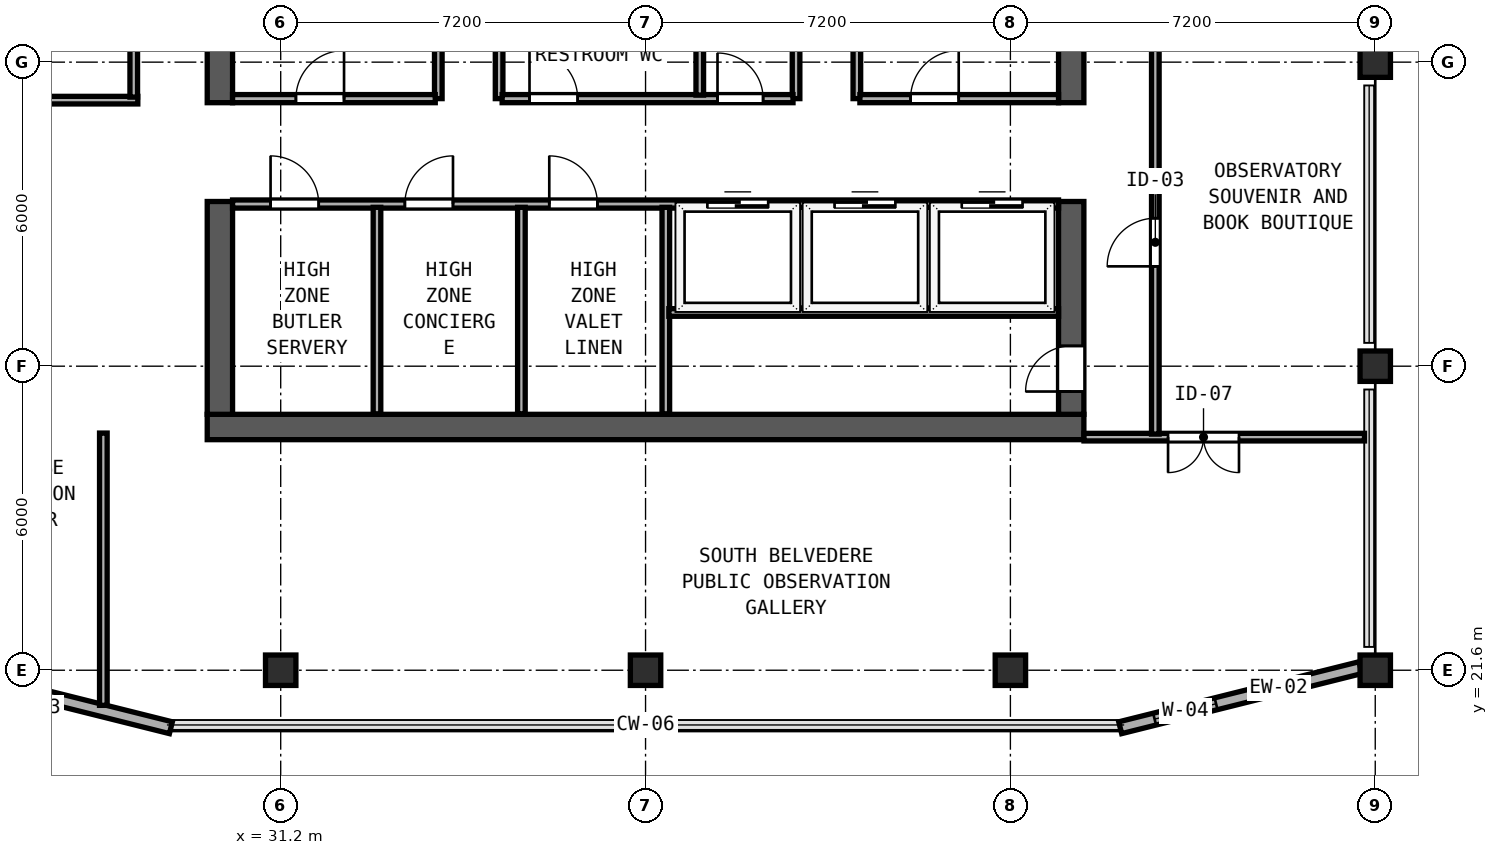
"""IFC4 building model, lengths in metres.
Left out: names, types, materials, properties, quantities, classifications, styles, units other than length and angle.
Written with IfcOpenShell. Run it as: python <this file> out.ifc"""

import sys

from ifc_helpers import new_model, si_unit, direction, frame, frame_2d, origin, origin_2d, place, context, subcontext, project, spatial, rectangle, hollow_rectangle, extrude, element, fill, save


model = new_model("IFC4")
c1 = context("Model", 3, precision=1e-05, world=origin(), true_north=direction((0.0, 1.0)))
c2 = subcontext(c1, "Body", "Model", "MODEL_VIEW")
j1 = project(units=[si_unit("LENGTHUNIT", "METRE"), si_unit("PLANEANGLEUNIT", "RADIAN")], contexts=[c1])
p1 = place(None, origin())
s1 = spatial("IfcSite", under=j1, at=p1, CompositionType="ELEMENT")
p2 = place(p1, origin())
s2 = spatial("IfcBuilding", under=s1, at=p2, CompositionType="ELEMENT")
p3 = place(p2, frame((0.0, 0.0, 318.2)))
s3 = spatial("IfcBuildingStorey", under=s2, at=p3, CompositionType="ELEMENT", Elevation=318.2)
p4 = place(p3, frame((29.75, 26.4, 0.0), z_axis=(0.0, 0.0, 1.0), x_axis=(1.0, 0.0, 0.0)))
e1 = element("IfcWall", 1, at=p4, inside=s3, PredefinedType="SHEAR", context=c2, shape_type="SweptSolid", body=[
    extrude(rectangle(XDim=17.3, YDim=0.5, at=frame_2d((8.65, 0.0))), origin(), (0.0, 0.0, 1.0), 4.76),
])
p5 = place(p3, frame((30.0, 26.65, 0.0), z_axis=(0.0, 0.0, 1.0), x_axis=(0.0, 1.0, 0.0)))
e2 = element("IfcWall", 2, at=p5, inside=s3, PredefinedType="SHEAR", context=c2, shape_type="SweptSolid", body=[
    extrude(rectangle(XDim=4.2, YDim=0.5, at=frame_2d((2.1, 0.0))), origin(), (0.0, 0.0, 1.0), 4.76),
])
p6 = place(p3, frame((30.0, 32.8, 0.0), z_axis=(0.0, 0.0, 1.0), x_axis=(0.0, 1.0, 0.0)))
e3 = element("IfcWall", 3, at=p6, inside=s3, PredefinedType="SHEAR", context=c2, shape_type="SweptSolid", body=[
    extrude(rectangle(XDim=10.15, YDim=0.5, at=frame_2d((5.075, 0.0))), origin(), (0.0, 0.0, 1.0), 4.76),
])
p7 = place(p3, frame((46.8, 26.65, 0.0), z_axis=(0.0, 0.0, 1.0), x_axis=(0.0, 1.0, 0.0)))
e4 = element("IfcWall", 4, at=p7, inside=s3, PredefinedType="SHEAR", context=c2, shape_type="SweptSolid", body=[
    extrude(rectangle(XDim=4.2, YDim=0.5, at=frame_2d((2.1, 0.0))), origin(), (0.0, 0.0, 1.0), 4.76),
])
p8 = place(p7, frame((1.35, 0.0, 0.0), z_axis=(0.0, 0.0, 1.0), x_axis=(-1.0, 0.0, 0.0)))
e5 = element("IfcOpeningElement", 5, at=p8, cuts=e4, PredefinedType="OPENING", context=c2, shape_type="SweptSolid", body=[
    extrude(rectangle(XDim=0.9, YDim=2.1, at=frame_2d((0.45, 1.05))), frame((0.0, 0.26, 0.0), z_axis=(0.0, -1.0, 0.0), x_axis=(1.0, 0.0, 0.0)), (0.0, 0.0, 1.0), 0.52),
])
p9 = place(p3, frame((46.8, 32.8, 0.0), z_axis=(0.0, 0.0, 1.0), x_axis=(0.0, 1.0, 0.0)))
e6 = element("IfcWall", 6, at=p9, inside=s3, PredefinedType="SHEAR", context=c2, shape_type="SweptSolid", body=[
    extrude(rectangle(XDim=10.15, YDim=0.5, at=frame_2d((5.075, 0.0))), origin(), (0.0, 0.0, 1.0), 4.76),
])
for number, where, z_axis, x_axis in (
    (7, (52.8, 21.6, 0.0), (0.0, 0.0, 1.0), (1.0, 0.0, 0.0)),
    (8, (52.8, 33.6, 0.0), (0.0, 0.0, 1.0), (1.0, 0.0, 0.0)),
    (9, (31.2, 21.6, 0.0), (0.0, 0.0, 1.0), (1.0, 0.0, 0.0)),
    (10, (45.6, 21.6, 0.0), (0.0, 0.0, 1.0), (1.0, 0.0, 0.0)),
    (11, (52.8, 27.6, 0.0), (0.0, 0.0, 1.0), (1.0, 0.0, 0.0)),
    (12, (38.4, 21.6, 0.0), (0.0, 0.0, 1.0), (1.0, 0.0, 0.0)),
):
    element("IfcColumn", number, at=place(p3, frame(where, z_axis=z_axis, x_axis=x_axis)), inside=s3, PredefinedType="COLUMN", context=c2, shape_type="SweptSolid", body=[
        extrude(hollow_rectangle(XDim=0.6, YDim=0.6, WallThickness=0.024, at=origin_2d()), origin(), (0.0, 0.0, 1.0), 5.0),
    ])
p10 = place(p3, frame((47.767, 20.465, 0.0), z_axis=(0.0, 0.0, 1.0), x_axis=(0.970142500145, 0.242535625036, 0.0)))
e13 = element("IfcWall", 13, at=p10, inside=s3, PredefinedType="SOLIDWALL", context=c2, shape_type="SweptSolid", body=[
    extrude(rectangle(XDim=4.887, YDim=0.24, at=frame_2d((2.444, 0.0))), origin(), (0.0, 0.0, 1.0), 4.355),
])
p11 = place(p10, frame((0.7, 0.0, 0.85)))
e14 = element("IfcOpeningElement", 14, at=p11, cuts=e13, PredefinedType="OPENING", context=c2, shape_type="SweptSolid", body=[
    extrude(rectangle(XDim=1.25, YDim=1.95, at=frame_2d((0.625, 0.975))), frame((0.0, 0.13, 0.0), z_axis=(0.0, -1.0, 0.0), x_axis=(1.0, 0.0, 0.0)), (0.0, 0.0, 1.0), 0.26),
])
p12 = place(p3, frame((24.292, 21.651, 0.0), z_axis=(0.0, 0.0, 1.0), x_axis=(0.970142500145, -0.242535625036, 0.0)))
e15 = element("IfcWall", 15, at=p12, inside=s3, PredefinedType="SOLIDWALL", context=c2, shape_type="SweptSolid", body=[
    extrude(rectangle(XDim=4.887, YDim=0.24, at=frame_2d((2.444, 0.0))), origin(), (0.0, 0.0, 1.0), 4.355),
])
p13 = place(p12, frame((0.559, 0.0, 0.85)))
e16 = element("IfcOpeningElement", 16, at=p13, cuts=e15, PredefinedType="OPENING", context=c2, shape_type="SweptSolid", body=[
    extrude(rectangle(XDim=1.25, YDim=1.95, at=frame_2d((0.625, 0.975))), frame((0.0, 0.13, 0.0), z_axis=(0.0, -1.0, 0.0), x_axis=(1.0, 0.0, 0.0)), (0.0, 0.0, 1.0), 0.26),
])
for number, where, z_axis, x_axis in (
    (17, (34.31, 32.88, 0.0), (0.0, 0.0, 1.0), (0.0, 1.0, 0.0)),
    (18, (35.51, 32.88, 0.0), (0.0, 0.0, 1.0), (0.0, 1.0, 0.0)),
    (19, (41.37, 32.88, 0.0), (0.0, 0.0, 1.0), (0.0, 1.0, 0.0)),
    (20, (42.57, 32.88, 0.0), (0.0, 0.0, 1.0), (0.0, 1.0, 0.0)),
):
    element("IfcWall", number, at=place(p3, frame(where, z_axis=z_axis, x_axis=x_axis)), inside=s3, PredefinedType="SOLIDWALL", context=c2, shape_type="SweptSolid", body=[
        extrude(rectangle(XDim=2.17, YDim=0.15, at=frame_2d((1.085, 0.0))), origin(), (0.0, 0.0, 1.0), 4.76),
    ])
p14 = place(p3, frame((30.25, 32.88, 0.0), z_axis=(0.0, 0.0, 1.0), x_axis=(1.0, 0.0, 0.0)))
e21 = element("IfcWall", 21, at=p14, inside=s3, PredefinedType="SOLIDWALL", context=c2, shape_type="SweptSolid", body=[
    extrude(rectangle(XDim=4.0, YDim=0.16, at=frame_2d((2.0, 0.0))), origin(), (0.0, 0.0, 1.0), 4.76),
])
p15 = place(p14, frame((2.2, 0.0, 0.0), z_axis=(0.0, 0.0, 1.0), x_axis=(-1.0, 0.0, 0.0)))
e22 = element("IfcOpeningElement", 22, at=p15, cuts=e21, PredefinedType="OPENING", context=c2, shape_type="SweptSolid", body=[
    extrude(rectangle(XDim=0.95, YDim=2.12, at=frame_2d((0.475, 1.06))), frame((0.0, 0.09, 0.0), z_axis=(0.0, -1.0, 0.0), x_axis=(1.0, 0.0, 0.0)), (0.0, 0.0, 1.0), 0.18),
])
p16 = place(p3, frame((35.57, 32.88, 0.0), z_axis=(0.0, 0.0, 1.0), x_axis=(1.0, 0.0, 0.0)))
e23 = element("IfcWall", 23, at=p16, inside=s3, PredefinedType="SOLIDWALL", context=c2, shape_type="SweptSolid", body=[
    extrude(rectangle(XDim=5.74, YDim=0.16, at=frame_2d((2.87, 0.0))), origin(), (0.0, 0.0, 1.0), 4.76),
])
p17 = place(p16, frame((1.49, 0.0, 0.0), z_axis=(0.0, 0.0, 1.0), x_axis=(-1.0, 0.0, 0.0)))
e24 = element("IfcOpeningElement", 24, at=p17, cuts=e23, PredefinedType="OPENING", context=c2, shape_type="SweptSolid", body=[
    extrude(rectangle(XDim=0.95, YDim=2.12, at=frame_2d((0.475, 1.06))), frame((0.0, 0.09, 0.0), z_axis=(0.0, -1.0, 0.0), x_axis=(1.0, 0.0, 0.0)), (0.0, 0.0, 1.0), 0.18),
])
p18 = place(p16, frame((5.15, 0.0, 0.0), z_axis=(0.0, 0.0, 1.0), x_axis=(-1.0, 0.0, 0.0)))
e25 = element("IfcOpeningElement", 25, at=p18, cuts=e23, PredefinedType="OPENING", context=c2, shape_type="SweptSolid", body=[
    extrude(rectangle(XDim=0.9, YDim=2.1, at=frame_2d((0.45, 1.05))), frame((0.0, 0.09, 0.0), z_axis=(0.0, -1.0, 0.0), x_axis=(1.0, 0.0, 0.0)), (0.0, 0.0, 1.0), 0.18),
])
p19 = place(p3, frame((42.63, 32.88, 0.0), z_axis=(0.0, 0.0, 1.0), x_axis=(1.0, 0.0, 0.0)))
e26 = element("IfcWall", 26, at=p19, inside=s3, PredefinedType="SOLIDWALL", context=c2, shape_type="SweptSolid", body=[
    extrude(rectangle(XDim=3.92, YDim=0.16, at=frame_2d((1.96, 0.0))), origin(), (0.0, 0.0, 1.0), 4.76),
])
p20 = place(p19, frame((1.95, 0.0, 0.0), z_axis=(0.0, 0.0, 1.0), x_axis=(-1.0, 0.0, 0.0)))
e27 = element("IfcOpeningElement", 27, at=p20, cuts=e26, PredefinedType="OPENING", context=c2, shape_type="SweptSolid", body=[
    extrude(rectangle(XDim=0.95, YDim=2.12, at=frame_2d((0.475, 1.06))), frame((0.0, 0.09, 0.0), z_axis=(0.0, -1.0, 0.0), x_axis=(1.0, 0.0, 0.0)), (0.0, 0.0, 1.0), 0.18),
])
p21 = place(p3, frame((39.47, 32.95, 0.0), z_axis=(0.0, 0.0, 1.0), x_axis=(0.0, 1.0, 0.0)))
e28 = element("IfcWall", 28, at=p21, inside=s3, PredefinedType="SOLIDWALL", context=c2, shape_type="SweptSolid", body=[
    extrude(rectangle(XDim=2.05, YDim=0.15, at=frame_2d((1.025, 0.0))), origin(), (0.0, 0.0, 1.0), 4.76),
])
p22 = place(p3, frame((30.25, 30.8, 0.0), z_axis=(0.0, 0.0, 1.0), x_axis=(1.0, 0.0, 0.0)))
e29 = element("IfcWall", 29, at=p22, inside=s3, PredefinedType="SOLIDWALL", context=c2, shape_type="SweptSolid", body=[
    extrude(rectangle(XDim=16.3, YDim=0.16, at=frame_2d((8.15, 0.0))), origin(), (0.0, 0.0, 1.0), 4.76),
])
p23 = place(p22, frame((0.75, 0.0, 0.0)))
e30 = element("IfcOpeningElement", 30, at=p23, cuts=e29, PredefinedType="OPENING", context=c2, shape_type="SweptSolid", body=[
    extrude(rectangle(XDim=0.95, YDim=2.12, at=frame_2d((0.475, 1.06))), frame((0.0, 0.09, 0.0), z_axis=(0.0, -1.0, 0.0), x_axis=(1.0, 0.0, 0.0)), (0.0, 0.0, 1.0), 0.18),
])
p24 = place(p22, frame((3.4, 0.0, 0.0)))
e31 = element("IfcOpeningElement", 31, at=p24, cuts=e29, PredefinedType="OPENING", context=c2, shape_type="SweptSolid", body=[
    extrude(rectangle(XDim=0.95, YDim=2.12, at=frame_2d((0.475, 1.06))), frame((0.0, 0.09, 0.0), z_axis=(0.0, -1.0, 0.0), x_axis=(1.0, 0.0, 0.0)), (0.0, 0.0, 1.0), 0.18),
])
p25 = place(p22, frame((6.25, 0.0, 0.0)))
e32 = element("IfcOpeningElement", 32, at=p25, cuts=e29, PredefinedType="OPENING", context=c2, shape_type="SweptSolid", body=[
    extrude(rectangle(XDim=0.95, YDim=2.12, at=frame_2d((0.475, 1.06))), frame((0.0, 0.09, 0.0), z_axis=(0.0, -1.0, 0.0), x_axis=(1.0, 0.0, 0.0)), (0.0, 0.0, 1.0), 0.18),
])
p26 = place(p22, frame((9.37, 0.0, 0.0)))
e33 = element("IfcOpeningElement", 33, at=p26, cuts=e29, PredefinedType="OPENING", context=c2, shape_type="SweptSolid", body=[
    extrude(rectangle(XDim=1.2, YDim=2.2, at=frame_2d((0.6, 1.1))), frame((0.0, 0.09, 0.0), z_axis=(0.0, -1.0, 0.0), x_axis=(1.0, 0.0, 0.0)), (0.0, 0.0, 1.0), 0.18),
])
p27 = place(p22, frame((11.88, 0.0, 0.0)))
e34 = element("IfcOpeningElement", 34, at=p27, cuts=e29, PredefinedType="OPENING", context=c2, shape_type="SweptSolid", body=[
    extrude(rectangle(XDim=1.2, YDim=2.2, at=frame_2d((0.6, 1.1))), frame((0.0, 0.09, 0.0), z_axis=(0.0, -1.0, 0.0), x_axis=(1.0, 0.0, 0.0)), (0.0, 0.0, 1.0), 0.18),
])
p28 = place(p22, frame((14.39, 0.0, 0.0)))
e35 = element("IfcOpeningElement", 35, at=p28, cuts=e29, PredefinedType="OPENING", context=c2, shape_type="SweptSolid", body=[
    extrude(rectangle(XDim=1.2, YDim=2.2, at=frame_2d((0.6, 1.1))), frame((0.0, 0.09, 0.0), z_axis=(0.0, -1.0, 0.0), x_axis=(1.0, 0.0, 0.0)), (0.0, 0.0, 1.0), 0.18),
])
p29 = place(p3, frame((38.8, 26.66, 0.0), z_axis=(0.0, 0.0, 1.0), x_axis=(0.0, 1.0, 0.0)))
e36 = element("IfcWall", 36, at=p29, inside=s3, PredefinedType="SOLIDWALL", context=c2, shape_type="SweptSolid", body=[
    extrude(rectangle(XDim=4.075, YDim=0.15, at=frame_2d((2.038, 0.0))), origin(), (0.0, 0.0, 1.0), 4.76),
])
for number, where, z_axis, x_axis in (
    (37, (33.1, 26.66, 0.0), (0.0, 0.0, 1.0), (0.0, 1.0, 0.0)),
    (38, (35.95, 26.66, 0.0), (0.0, 0.0, 1.0), (0.0, 1.0, 0.0)),
):
    element("IfcWall", number, at=place(p3, frame(where, z_axis=z_axis, x_axis=x_axis)), inside=s3, PredefinedType="PARTITIONING", context=c2, shape_type="SweptSolid", body=[
        extrude(rectangle(XDim=4.075, YDim=0.15, at=frame_2d((2.038, 0.0))), origin(), (0.0, 0.0, 1.0), 4.76),
    ])
p30 = place(p3, frame((38.86, 28.66, 0.0), z_axis=(0.0, 0.0, 1.0), x_axis=(1.0, 0.0, 0.0)))
e39 = element("IfcWall", 39, at=p30, inside=s3, PredefinedType="PARTITIONING", context=c2, shape_type="SweptSolid", body=[
    extrude(rectangle(XDim=7.69, YDim=0.15, at=frame_2d((3.845, 0.0))), origin(), (0.0, 0.0, 1.0), 4.76),
])
for number, where, z_axis, x_axis in (
    (40, (41.47, 28.75, 0.0), (0.0, 0.0, 1.0), (0.0, 1.0, 0.0)),
    (41, (43.98, 28.75, 0.0), (0.0, 0.0, 1.0), (0.0, 1.0, 0.0)),
):
    element("IfcWall", number, at=place(p3, frame(where, z_axis=z_axis, x_axis=x_axis)), inside=s3, PredefinedType="SOLIDWALL", context=c2, shape_type="SweptSolid", body=[
        extrude(rectangle(XDim=1.985, YDim=0.15, at=frame_2d((0.993, 0.0))), origin(), (0.0, 0.0, 1.0), 4.76),
    ])
p31 = place(p3, frame((47.052, 26.2, 0.0), z_axis=(0.0, 0.0, 1.0), x_axis=(1.0, 0.0, 0.0)))
e42 = element("IfcWall", 42, at=p31, inside=s3, PredefinedType="PARTITIONING", context=c2, shape_type="SweptSolid", body=[
    extrude(rectangle(XDim=5.536, YDim=0.15, at=frame_2d((2.768, 0.0))), origin(), (0.0, 0.0, 1.0), 4.76),
])
p32 = place(p31, frame((3.059, 0.0, 0.0), z_axis=(0.0, 0.0, 1.0), x_axis=(-1.0, 0.0, 0.0)))
e43 = element("IfcOpeningElement", 43, at=p32, cuts=e42, PredefinedType="OPENING", context=c2, shape_type="SweptSolid", body=[
    extrude(rectangle(XDim=1.4, YDim=2.18, at=frame_2d((0.7, 1.09))), frame((0.0, 0.085, 0.0), z_axis=(0.0, -1.0, 0.0), x_axis=(1.0, 0.0, 0.0)), (0.0, 0.0, 1.0), 0.17),
])
p33 = place(p3, frame((27.7, 20.907, 0.0), z_axis=(0.0, 0.0, 1.0), x_axis=(0.0, 1.0, 0.0)))
e44 = element("IfcWall", 44, at=p33, inside=s3, PredefinedType="PARTITIONING", context=c2, shape_type="SweptSolid", body=[
    extrude(rectangle(XDim=5.373, YDim=0.15, at=frame_2d((2.687, 0.0))), origin(), (0.0, 0.0, 1.0), 4.76),
])
p34 = place(p3, frame((24.225, 32.85, 0.0), z_axis=(0.0, 0.0, 1.0), x_axis=(1.0, 0.0, 0.0)))
e45 = element("IfcWall", 45, at=p34, inside=s3, PredefinedType="PARTITIONING", context=c2, shape_type="SweptSolid", body=[
    extrude(rectangle(XDim=4.155, YDim=0.15, at=frame_2d((2.077, 0.0))), origin(), (0.0, 0.0, 1.0), 4.76),
])
p35 = place(p3, frame((28.3, 32.91, 0.0), z_axis=(0.0, 0.0, 1.0), x_axis=(0.0, 1.0, 0.0)))
e46 = element("IfcWall", 46, at=p35, inside=s3, PredefinedType="PARTITIONING", context=c2, shape_type="SweptSolid", body=[
    extrude(rectangle(XDim=8.23, YDim=0.15, at=frame_2d((4.115, 0.0))), origin(), (0.0, 0.0, 1.0), 4.76),
])
p36 = place(p35, frame((4.01, 0.0, 0.0), z_axis=(0.0, 0.0, 1.0), x_axis=(-1.0, 0.0, 0.0)))
e47 = element("IfcOpeningElement", 47, at=p36, cuts=e46, PredefinedType="OPENING", context=c2, shape_type="SweptSolid", body=[
    extrude(rectangle(XDim=0.95, YDim=2.12, at=frame_2d((0.475, 1.06))), frame((0.0, 0.085, 0.0), z_axis=(0.0, -1.0, 0.0), x_axis=(1.0, 0.0, 0.0)), (0.0, 0.0, 1.0), 0.17),
])
p37 = place(p3, frame((48.46, 26.26, 0.0), z_axis=(0.0, 0.0, 1.0), x_axis=(0.0, 1.0, 0.0)))
e48 = element("IfcWall", 48, at=p37, inside=s3, PredefinedType="PARTITIONING", context=c2, shape_type="SweptSolid", body=[
    extrude(rectangle(XDim=9.88, YDim=0.15, at=frame_2d((4.94, 0.0))), origin(), (0.0, 0.0, 1.0), 4.76),
])
p38 = place(p37, frame((3.31, 0.0, 0.0)))
e49 = element("IfcOpeningElement", 49, at=p38, cuts=e48, PredefinedType="OPENING", context=c2, shape_type="SweptSolid", body=[
    extrude(rectangle(XDim=0.95, YDim=2.12, at=frame_2d((0.475, 1.06))), frame((0.0, 0.085, 0.0), z_axis=(0.0, -1.0, 0.0), x_axis=(1.0, 0.0, 0.0)), (0.0, 0.0, 1.0), 0.17),
])
p39 = place(p11, origin())
e50 = element("IfcWindow", 50, at=p39, inside=s3, PartitioningType="SINGLE_PANEL", PredefinedType="WINDOW", context=c2, shape_type="SweptSolid", body=[
    extrude(rectangle(XDim=1.25, YDim=1.95, at=frame_2d((0.625, 0.975))), frame((0.0, 0.03, 0.0), z_axis=(0.0, -1.0, 0.0), x_axis=(1.0, 0.0, 0.0)), (0.0, 0.0, 1.0), 0.06),
])
fill(e14, e50)
p40 = place(p15, origin())
e51 = element("IfcDoor", 51, at=p40, inside=s3, OperationType="SINGLE_SWING_LEFT", PredefinedType="DOOR", context=c2, shape_type="SweptSolid", body=[
    extrude(rectangle(XDim=0.95, YDim=2.12, at=frame_2d((0.475, 1.06))), frame((0.0, 0.025, 0.0), z_axis=(0.0, -1.0, 0.0), x_axis=(1.0, 0.0, 0.0)), (0.0, 0.0, 1.0), 0.05),
])
fill(e22, e51)
p41 = place(p17, origin())
e52 = element("IfcDoor", 52, at=p41, inside=s3, OperationType="SINGLE_SWING_RIGHT", PredefinedType="DOOR", context=c2, shape_type="SweptSolid", body=[
    extrude(rectangle(XDim=0.95, YDim=2.12, at=frame_2d((0.475, 1.06))), frame((0.0, 0.025, 0.0), z_axis=(0.0, -1.0, 0.0), x_axis=(1.0, 0.0, 0.0)), (0.0, 0.0, 1.0), 0.05),
])
fill(e24, e52)
p42 = place(p18, origin())
e53 = element("IfcDoor", 53, at=p42, inside=s3, OperationType="SINGLE_SWING_RIGHT", PredefinedType="DOOR", context=c2, shape_type="SweptSolid", body=[
    extrude(rectangle(XDim=0.9, YDim=2.1, at=frame_2d((0.45, 1.05))), frame((0.0, 0.025, 0.0), z_axis=(0.0, -1.0, 0.0), x_axis=(1.0, 0.0, 0.0)), (0.0, 0.0, 1.0), 0.05),
])
fill(e25, e53)
p43 = place(p20, origin())
e54 = element("IfcDoor", 54, at=p43, inside=s3, OperationType="SINGLE_SWING_LEFT", PredefinedType="DOOR", context=c2, shape_type="SweptSolid", body=[
    extrude(rectangle(XDim=0.95, YDim=2.12, at=frame_2d((0.475, 1.06))), frame((0.0, 0.025, 0.0), z_axis=(0.0, -1.0, 0.0), x_axis=(1.0, 0.0, 0.0)), (0.0, 0.0, 1.0), 0.05),
])
fill(e27, e54)
p44 = place(p23, origin())
e55 = element("IfcDoor", 55, at=p44, inside=s3, OperationType="SINGLE_SWING_LEFT", PredefinedType="DOOR", context=c2, shape_type="SweptSolid", body=[
    extrude(rectangle(XDim=0.95, YDim=2.12, at=frame_2d((0.475, 1.06))), frame((0.0, 0.025, 0.0), z_axis=(0.0, -1.0, 0.0), x_axis=(1.0, 0.0, 0.0)), (0.0, 0.0, 1.0), 0.05),
])
fill(e30, e55)
p45 = place(p24, origin())
e56 = element("IfcDoor", 56, at=p45, inside=s3, OperationType="SINGLE_SWING_RIGHT", PredefinedType="DOOR", context=c2, shape_type="SweptSolid", body=[
    extrude(rectangle(XDim=0.95, YDim=2.12, at=frame_2d((0.475, 1.06))), frame((0.0, 0.025, 0.0), z_axis=(0.0, -1.0, 0.0), x_axis=(1.0, 0.0, 0.0)), (0.0, 0.0, 1.0), 0.05),
])
fill(e31, e56)
p46 = place(p25, origin())
e57 = element("IfcDoor", 57, at=p46, inside=s3, OperationType="SINGLE_SWING_LEFT", PredefinedType="DOOR", context=c2, shape_type="SweptSolid", body=[
    extrude(rectangle(XDim=0.95, YDim=2.12, at=frame_2d((0.475, 1.06))), frame((0.0, 0.025, 0.0), z_axis=(0.0, -1.0, 0.0), x_axis=(1.0, 0.0, 0.0)), (0.0, 0.0, 1.0), 0.05),
])
fill(e32, e57)
p47 = place(p8, origin())
e58 = element("IfcDoor", 58, at=p47, inside=s3, OperationType="SINGLE_SWING_RIGHT", PredefinedType="DOOR", context=c2, shape_type="SweptSolid", body=[
    extrude(rectangle(XDim=0.9, YDim=2.1, at=frame_2d((0.45, 1.05))), frame((0.0, -0.135, 0.0), z_axis=(0.0, -1.0, 0.0), x_axis=(1.0, 0.0, 0.0)), (0.0, 0.0, 1.0), 0.05),
])
fill(e5, e58)
p48 = place(p26, origin())
e59 = element("IfcDoor", 59, at=p48, inside=s3, OperationType="SLIDING_TO_RIGHT", PredefinedType="DOOR", context=c2, shape_type="SweptSolid", body=[
    extrude(rectangle(XDim=1.2, YDim=2.2, at=frame_2d((0.6, 1.1))), frame((0.0, 0.025, 0.0), z_axis=(0.0, -1.0, 0.0), x_axis=(1.0, 0.0, 0.0)), (0.0, 0.0, 1.0), 0.05),
])
fill(e33, e59)
p49 = place(p27, origin())
e60 = element("IfcDoor", 60, at=p49, inside=s3, OperationType="SLIDING_TO_RIGHT", PredefinedType="DOOR", context=c2, shape_type="SweptSolid", body=[
    extrude(rectangle(XDim=1.2, YDim=2.2, at=frame_2d((0.6, 1.1))), frame((0.0, 0.025, 0.0), z_axis=(0.0, -1.0, 0.0), x_axis=(1.0, 0.0, 0.0)), (0.0, 0.0, 1.0), 0.05),
])
fill(e34, e60)
p50 = place(p28, origin())
e61 = element("IfcDoor", 61, at=p50, inside=s3, OperationType="SLIDING_TO_RIGHT", PredefinedType="DOOR", context=c2, shape_type="SweptSolid", body=[
    extrude(rectangle(XDim=1.2, YDim=2.2, at=frame_2d((0.6, 1.1))), frame((0.0, 0.025, 0.0), z_axis=(0.0, -1.0, 0.0), x_axis=(1.0, 0.0, 0.0)), (0.0, 0.0, 1.0), 0.05),
])
fill(e35, e61)
p51 = place(p32, origin())
e62 = element("IfcDoor", 62, at=p51, inside=s3, OperationType="DOUBLE_DOOR_SINGLE_SWING", PredefinedType="DOOR", context=c2, shape_type="SweptSolid", body=[
    extrude(rectangle(XDim=1.4, YDim=2.18, at=frame_2d((0.7, 1.09))), frame((0.0, 0.025, 0.0), z_axis=(0.0, -1.0, 0.0), x_axis=(1.0, 0.0, 0.0)), (0.0, 0.0, 1.0), 0.05),
])
fill(e43, e62)
p52 = place(p38, origin())
e63 = element("IfcDoor", 63, at=p52, inside=s3, OperationType="SINGLE_SWING_LEFT", PredefinedType="DOOR", context=c2, shape_type="SweptSolid", body=[
    extrude(rectangle(XDim=0.95, YDim=2.12, at=frame_2d((0.475, 1.06))), frame((0.0, 0.025, 0.0), z_axis=(0.0, -1.0, 0.0), x_axis=(1.0, 0.0, 0.0)), (0.0, 0.0, 1.0), 0.05),
])
fill(e49, e63)
save(model, sys.argv[1])
